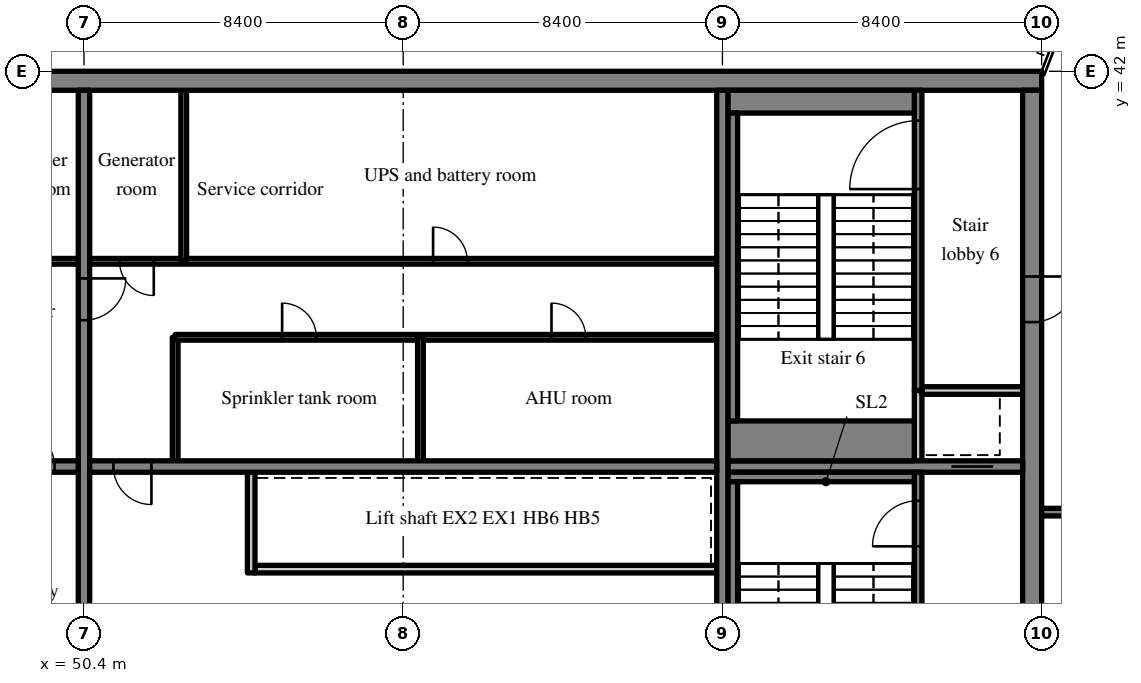
"""IFC4 building model, lengths in metres.
Left out: names, types, materials, properties, quantities, classifications, styles, units other than length and angle.
Written with IfcOpenShell. Run it as: python <this file> out.ifc"""

import sys

from ifc_helpers import new_model, si_unit, direction, frame, frame_2d, origin, place, context, subcontext, project, spatial, rectangle, extrude, source, transform, mapped, element, fill, save


model = new_model("IFC4")
c1 = context("Model", 3, precision=1e-05, world=origin(), true_north=direction((0.0, 1.0)))
c2 = subcontext(c1, "Body", "Model", "MODEL_VIEW")
j1 = project(units=[si_unit("LENGTHUNIT", "METRE"), si_unit("PLANEANGLEUNIT", "RADIAN")], contexts=[c1])
p1 = place(None, origin())
s1 = spatial("IfcSite", under=j1, at=p1, CompositionType="ELEMENT")
p2 = place(p1, origin())
s2 = spatial("IfcBuilding", under=s1, at=p2, CompositionType="ELEMENT")
p3 = place(p2, frame((0.0, 0.0, 317.7)))
s3 = spatial("IfcBuildingStorey", under=s2, at=p3, CompositionType="ELEMENT", Elevation=317.7)
m1 = source(origin(), c2, "Body", "SweptSolid", [
    extrude(rectangle(XDim=50.4, YDim=0.5, at=frame_2d((25.2, 0.0))), origin(), (0.0, 0.0, 1.0), 5.72),
])
p4 = place(p3, frame((25.2, 41.75, 0.0), z_axis=(0.0, 0.0, 1.0), x_axis=(1.0, 0.0, 0.0)))
e1 = element("IfcWall", 1, at=p4, inside=s3, PredefinedType="SHEAR", context=c2, shape_type="MappedRepresentation", body=[
    mapped(m1, transform((0.0, 0.0, 0.0), scale=1.0)),
])
m2 = source(origin(), c2, "Body", "SweptSolid", [
    extrude(rectangle(XDim=19.0, YDim=0.5, at=frame_2d((9.5, 0.0))), origin(), (0.0, 0.0, 1.0), 5.72),
])
p5 = place(p3, frame((75.35, 22.5, 0.0), z_axis=(0.0, 0.0, 1.0), x_axis=(0.0, 1.0, 0.0)))
e2 = element("IfcWall", 2, at=p5, inside=s3, PredefinedType="SHEAR", context=c2, shape_type="MappedRepresentation", body=[
    mapped(m2, transform((0.0, 0.0, 0.0), scale=1.0)),
])
m3 = source(origin(), c2, "Body", "SweptSolid", [
    extrude(rectangle(XDim=1.2, YDim=2.1, at=frame_2d((0.6, 1.05))), frame((0.0, 0.26, 0.0), z_axis=(0.0, -1.0, 0.0), x_axis=(1.0, 0.0, 0.0)), (0.0, 0.0, 1.0), 0.52),
])
p6 = place(p5, frame((12.9, 0.0, 0.0)))
e3 = element("IfcOpeningElement", 3, at=p6, cuts=e2, PredefinedType="OPENING", context=c2, shape_type="MappedRepresentation", body=[
    mapped(m3, transform((0.0, 0.0, 0.0), scale=1.0)),
])
m4 = source(origin(), c2, "Body", "SweptSolid", [
    extrude(rectangle(XDim=19.0, YDim=0.3, at=frame_2d((9.5, 0.0))), origin(), (0.0, 0.0, 1.0), 5.72),
])
p7 = place(p3, frame((50.4, 22.5, 0.0), z_axis=(0.0, 0.0, 1.0), x_axis=(0.0, 1.0, 0.0)))
e4 = element("IfcWall", 4, at=p7, inside=s3, PredefinedType="SHEAR", context=c2, shape_type="MappedRepresentation", body=[
    mapped(m4, transform((0.0, 0.0, 0.0), scale=1.0)),
])
m5 = source(origin(), c2, "Body", "SweptSolid", [
    extrude(rectangle(XDim=1.1, YDim=2.1, at=frame_2d((0.55, 1.05))), frame((0.0, 0.16, 0.0), z_axis=(0.0, -1.0, 0.0), x_axis=(1.0, 0.0, 0.0)), (0.0, 0.0, 1.0), 0.32),
])
p8 = place(p7, frame((12.95, 0.0, 0.0)))
e5 = element("IfcOpeningElement", 5, at=p8, cuts=e4, PredefinedType="OPENING", context=c2, shape_type="MappedRepresentation", body=[
    mapped(m5, transform((0.0, 0.0, 0.0), scale=1.0)),
])
p9 = place(p3, frame((67.2, 22.5, 0.0), z_axis=(0.0, 0.0, 1.0), x_axis=(0.0, 1.0, 0.0)))
e6 = element("IfcWall", 6, at=p9, inside=s3, PredefinedType="SHEAR", context=c2, shape_type="MappedRepresentation", body=[
    mapped(m4, transform((0.0, 0.0, 0.0), scale=1.0)),
])
m6 = source(origin(), c2, "Body", "SweptSolid", [
    extrude(rectangle(XDim=16.5, YDim=0.3, at=frame_2d((8.25, 0.0))), origin(), (0.0, 0.0, 1.0), 5.72),
])
p10 = place(p3, frame((33.75, 31.6, 0.0), z_axis=(0.0, 0.0, 1.0), x_axis=(1.0, 0.0, 0.0)))
e7 = element("IfcWall", 7, at=p10, inside=s3, PredefinedType="SHEAR", context=c2, shape_type="MappedRepresentation", body=[
    mapped(m6, transform((0.0, 0.0, 0.0), scale=1.0)),
])
m7 = source(origin(), c2, "Body", "SweptSolid", [
    extrude(rectangle(XDim=1.0, YDim=2.1, at=frame_2d((0.5, 1.05))), frame((0.0, 0.16, 0.0), z_axis=(0.0, -1.0, 0.0), x_axis=(1.0, 0.0, 0.0)), (0.0, 0.0, 1.0), 0.32),
])
p11 = place(p10, frame((14.875, 0.0, 0.0)))
e8 = element("IfcOpeningElement", 8, at=p11, cuts=e7, PredefinedType="OPENING", context=c2, shape_type="MappedRepresentation", body=[
    mapped(m7, transform((0.0, 0.0, 0.0), scale=1.0)),
])
p12 = place(p3, frame((50.55, 31.6, 0.0), z_axis=(0.0, 0.0, 1.0), x_axis=(1.0, 0.0, 0.0)))
e9 = element("IfcWall", 9, at=p12, inside=s3, PredefinedType="SHEAR", context=c2, shape_type="MappedRepresentation", body=[
    mapped(m6, transform((0.0, 0.0, 0.0), scale=1.0)),
])
p13 = place(p12, frame((0.625, 0.0, 0.0)))
e10 = element("IfcOpeningElement", 10, at=p13, cuts=e9, PredefinedType="OPENING", context=c2, shape_type="MappedRepresentation", body=[
    mapped(m7, transform((0.0, 0.0, 0.0), scale=1.0)),
])
m8 = source(origin(), c2, "Body", "SweptSolid", [
    extrude(rectangle(XDim=7.75, YDim=0.3, at=frame_2d((3.875, 0.0))), origin(), (0.0, 0.0, 1.0), 5.72),
])
p14 = place(p3, frame((67.35, 31.6, 0.0), z_axis=(0.0, 0.0, 1.0), x_axis=(1.0, 0.0, 0.0)))
e11 = element("IfcWall", 11, at=p14, inside=s3, PredefinedType="SHEAR", context=c2, shape_type="MappedRepresentation", body=[
    mapped(m8, transform((0.0, 0.0, 0.0), scale=1.0)),
])
p15 = place(p14, frame((5.875, 0.0, 0.0)))
e12 = element("IfcOpeningElement", 12, at=p15, cuts=e11, PredefinedType="OPENING", context=c2, shape_type="MappedRepresentation", body=[
    mapped(m5, transform((0.0, 0.0, 0.0), scale=1.0)),
])
m9 = source(origin(), c2, "Body", "SweptSolid", [
    extrude(rectangle(XDim=16.5, YDim=0.15, at=frame_2d((8.25, 0.0))), origin(), (0.0, 0.0, 1.0), 5.72),
])
p16 = place(p3, frame((33.75, 37.0, 0.0), z_axis=(0.0, 0.0, 1.0), x_axis=(1.0, 0.0, 0.0)))
e13 = element("IfcWall", 13, at=p16, inside=s3, PredefinedType="PARTITIONING", context=c2, shape_type="MappedRepresentation", body=[
    mapped(m9, transform((0.0, 0.0, 0.0), scale=1.0)),
])
m10 = source(origin(), c2, "Body", "SweptSolid", [
    extrude(rectangle(XDim=0.9, YDim=2.1, at=frame_2d((0.45, 1.05))), frame((0.0, 0.085, 0.0), z_axis=(0.0, -1.0, 0.0), x_axis=(1.0, 0.0, 0.0)), (0.0, 0.0, 1.0), 0.17),
])
p17 = place(p16, frame((0.787, 0.0, 0.0)))
e14 = element("IfcOpeningElement", 14, at=p17, cuts=e13, PredefinedType="OPENING", context=c2, shape_type="MappedRepresentation", body=[
    mapped(m10, transform((0.0, 0.0, 0.0), scale=1.0)),
])
p18 = place(p16, frame((3.675, 0.0, 0.0)))
e15 = element("IfcOpeningElement", 15, at=p18, cuts=e13, PredefinedType="OPENING", context=c2, shape_type="MappedRepresentation", body=[
    mapped(m10, transform((0.0, 0.0, 0.0), scale=1.0)),
])
p19 = place(p16, frame((9.45, 0.0, 0.0)))
e16 = element("IfcOpeningElement", 16, at=p19, cuts=e13, PredefinedType="OPENING", context=c2, shape_type="MappedRepresentation", body=[
    mapped(m10, transform((0.0, 0.0, 0.0), scale=1.0)),
])
p20 = place(p16, frame((14.813, 0.0, 0.0)))
e17 = element("IfcOpeningElement", 17, at=p20, cuts=e13, PredefinedType="OPENING", context=c2, shape_type="MappedRepresentation", body=[
    mapped(m10, transform((0.0, 0.0, 0.0), scale=1.0)),
])
m11 = source(origin(), c2, "Body", "SweptSolid", [
    extrude(rectangle(XDim=12.15, YDim=0.2, at=frame_2d((6.075, 0.0))), origin(), (0.0, 0.0, 1.0), 5.72),
])
p21 = place(p3, frame((67.05, 28.9, 0.0), z_axis=(0.0, 0.0, 1.0), x_axis=(-1.0, 0.0, 0.0)))
e18 = element("IfcWall", 18, at=p21, inside=s3, PredefinedType="SOLIDWALL", context=c2, shape_type="MappedRepresentation", body=[
    mapped(m11, transform((0.0, 0.0, 0.0), scale=1.0)),
])
m12 = source(origin(), c2, "Body", "SweptSolid", [
    extrude(rectangle(XDim=2.65, YDim=0.2, at=frame_2d((1.325, 0.0))), origin(), (0.0, 0.0, 1.0), 5.72),
])
p22 = place(p3, frame((54.8, 28.8, 0.0), z_axis=(0.0, 0.0, 1.0), x_axis=(0.0, 1.0, 0.0)))
e19 = element("IfcWall", 19, at=p22, inside=s3, PredefinedType="SOLIDWALL", context=c2, shape_type="MappedRepresentation", body=[
    mapped(m12, transform((0.0, 0.0, 0.0), scale=1.0)),
])
m13 = source(origin(), c2, "Body", "SweptSolid", [
    extrude(rectangle(XDim=3.25, YDim=0.15, at=frame_2d((1.625, 0.0))), origin(), (0.0, 0.0, 1.0), 5.72),
])
p23 = place(p3, frame((52.8, 31.75, 0.0), z_axis=(0.0, 0.0, 1.0), x_axis=(0.0, 1.0, 0.0)))
e20 = element("IfcWall", 20, at=p23, inside=s3, PredefinedType="PARTITIONING", context=c2, shape_type="MappedRepresentation", body=[
    mapped(m13, transform((0.0, 0.0, 0.0), scale=1.0)),
])
m14 = source(origin(), c2, "Body", "SweptSolid", [
    extrude(rectangle(XDim=14.25, YDim=0.15, at=frame_2d((7.125, 0.0))), origin(), (0.0, 0.0, 1.0), 5.72),
])
p24 = place(p3, frame((67.05, 35.0, 0.0), z_axis=(0.0, 0.0, 1.0), x_axis=(-1.0, 0.0, 0.0)))
e21 = element("IfcWall", 21, at=p24, inside=s3, PredefinedType="PARTITIONING", context=c2, shape_type="MappedRepresentation", body=[
    mapped(m14, transform((0.0, 0.0, 0.0), scale=1.0)),
])
p25 = place(p24, frame((3.448, 0.0, 0.0)))
e22 = element("IfcOpeningElement", 22, at=p25, cuts=e21, PredefinedType="OPENING", context=c2, shape_type="MappedRepresentation", body=[
    mapped(m10, transform((0.0, 0.0, 0.0), scale=1.0)),
])
p26 = place(p24, frame((10.536, 0.0, 0.0)))
e23 = element("IfcOpeningElement", 23, at=p26, cuts=e21, PredefinedType="OPENING", context=c2, shape_type="MappedRepresentation", body=[
    mapped(m10, transform((0.0, 0.0, 0.0), scale=1.0)),
])
p27 = place(p3, frame((67.05, 37.0, 0.0), z_axis=(0.0, 0.0, 1.0), x_axis=(-1.0, 0.0, 0.0)))
e24 = element("IfcWall", 24, at=p27, inside=s3, PredefinedType="PARTITIONING", context=c2, shape_type="MappedRepresentation", body=[
    mapped(m9, transform((0.0, 0.0, 0.0), scale=1.0)),
])
p28 = place(p27, frame((6.563, 0.0, 0.0)))
e25 = element("IfcOpeningElement", 25, at=p28, cuts=e24, PredefinedType="OPENING", context=c2, shape_type="MappedRepresentation", body=[
    mapped(m10, transform((0.0, 0.0, 0.0), scale=1.0)),
])
p29 = place(p27, frame((14.813, 0.0, 0.0)))
e26 = element("IfcOpeningElement", 26, at=p29, cuts=e24, PredefinedType="OPENING", context=c2, shape_type="MappedRepresentation", body=[
    mapped(m10, transform((0.0, 0.0, 0.0), scale=1.0)),
])
p30 = place(p3, frame((59.254, 31.75, 0.0), z_axis=(0.0, 0.0, 1.0), x_axis=(0.0, 1.0, 0.0)))
e27 = element("IfcWall", 27, at=p30, inside=s3, PredefinedType="PARTITIONING", context=c2, shape_type="MappedRepresentation", body=[
    mapped(m13, transform((0.0, 0.0, 0.0), scale=1.0)),
])
m15 = source(origin(), c2, "Body", "SweptSolid", [
    extrude(rectangle(XDim=4.5, YDim=0.15, at=frame_2d((2.25, 0.0))), origin(), (0.0, 0.0, 1.0), 5.72),
])
p31 = place(p3, frame((53.025, 37.0, 0.0), z_axis=(0.0, 0.0, 1.0), x_axis=(0.0, 1.0, 0.0)))
e28 = element("IfcWall", 28, at=p31, inside=s3, PredefinedType="PARTITIONING", context=c2, shape_type="MappedRepresentation", body=[
    mapped(m15, transform((0.0, 0.0, 0.0), scale=1.0)),
])
m16 = source(origin(), c2, "Body", "SweptSolid", [
    extrude(rectangle(XDim=8.95, YDim=0.2, at=frame_2d((4.475, 0.0))), origin(), (0.0, 0.0, 1.0), 5.72),
])
p32 = place(p3, frame((72.35, 22.5, 0.0), z_axis=(0.0, 0.0, 1.0), x_axis=(0.0, 1.0, 0.0)))
e29 = element("IfcWall", 29, at=p32, inside=s3, PredefinedType="SOLIDWALL", context=c2, shape_type="MappedRepresentation", body=[
    mapped(m16, transform((0.0, 0.0, 0.0), scale=1.0)),
])
m17 = source(origin(), c2, "Body", "SweptSolid", [
    extrude(rectangle(XDim=1.2, YDim=2.1, at=frame_2d((0.6, 1.05))), frame((0.0, 0.11, 0.0), z_axis=(0.0, -1.0, 0.0), x_axis=(1.0, 0.0, 0.0)), (0.0, 0.0, 1.0), 0.22),
])
p33 = place(p32, frame((7.0, 0.0, 0.0)))
e30 = element("IfcOpeningElement", 30, at=p33, cuts=e29, PredefinedType="OPENING", context=c2, shape_type="MappedRepresentation", body=[
    mapped(m17, transform((0.0, 0.0, 0.0), scale=1.0)),
])
m18 = source(origin(), c2, "Body", "SweptSolid", [
    extrude(rectangle(XDim=1.85, YDim=0.2, at=frame_2d((0.925, 0.0))), origin(), (0.0, 0.0, 1.0), 5.72),
])
p34 = place(p3, frame((72.35, 31.75, 0.0), z_axis=(0.0, 0.0, 1.0), x_axis=(0.0, 1.0, 0.0)))
e31 = element("IfcWall", 31, at=p34, inside=s3, PredefinedType="SOLIDWALL", context=c2, shape_type="MappedRepresentation", body=[
    mapped(m18, transform((0.0, 0.0, 0.0), scale=1.0)),
])
m19 = source(origin(), c2, "Body", "SweptSolid", [
    extrude(rectangle(XDim=2.65, YDim=0.2, at=frame_2d((1.325, 0.0))), origin(), (0.0, 0.0, 1.0), 5.72),
])
p35 = place(p3, frame((72.45, 33.6, 0.0), z_axis=(0.0, 0.0, 1.0), x_axis=(1.0, 0.0, 0.0)))
e32 = element("IfcWall", 32, at=p35, inside=s3, PredefinedType="SOLIDWALL", context=c2, shape_type="MappedRepresentation", body=[
    mapped(m19, transform((0.0, 0.0, 0.0), scale=1.0)),
])
m20 = source(origin(), c2, "Body", "SweptSolid", [
    extrude(rectangle(XDim=7.9, YDim=0.2, at=frame_2d((3.95, 0.0))), origin(), (0.0, 0.0, 1.0), 5.72),
])
p36 = place(p3, frame((72.35, 33.6, 0.0), z_axis=(0.0, 0.0, 1.0), x_axis=(0.0, 1.0, 0.0)))
e33 = element("IfcWall", 33, at=p36, inside=s3, PredefinedType="SOLIDWALL", context=c2, shape_type="MappedRepresentation", body=[
    mapped(m20, transform((0.0, 0.0, 0.0), scale=1.0)),
])
m21 = source(origin(), c2, "Body", "SweptSolid", [
    extrude(rectangle(XDim=1.8, YDim=2.1, at=frame_2d((0.9, 1.05))), frame((0.0, 0.11, 0.0), z_axis=(0.0, -1.0, 0.0), x_axis=(1.0, 0.0, 0.0)), (0.0, 0.0, 1.0), 0.22),
])
p37 = place(p36, frame((5.3, 0.0, 0.0)))
e34 = element("IfcOpeningElement", 34, at=p37, cuts=e33, PredefinedType="OPENING", context=c2, shape_type="MappedRepresentation", body=[
    mapped(m21, transform((0.0, 0.0, 0.0), scale=1.0)),
])
m22 = source(origin(), c2, "Body", "SweptSolid", [
    extrude(rectangle(XDim=8.15, YDim=0.2, at=frame_2d((4.075, 0.0))), origin(), (0.0, 0.0, 1.0), 5.72),
])
p38 = place(p3, frame((83.75, 30.4, 0.0), z_axis=(0.0, 0.0, 1.0), x_axis=(-1.0, 0.0, 0.0)))
e35 = element("IfcWall", 35, at=p38, inside=s3, PredefinedType="SOLIDWALL", context=c2, shape_type="MappedRepresentation", body=[
    mapped(m22, transform((0.0, 0.0, 0.0), scale=1.0)),
])
m23 = source(origin(), c2, "Body", "SweptSolid", [
    extrude(rectangle(XDim=1.0, YDim=2.1, at=frame_2d((0.5, 1.05))), frame((0.0, 0.11, 0.0), z_axis=(0.0, -1.0, 0.0), x_axis=(1.0, 0.0, 0.0)), (0.0, 0.0, 1.0), 0.22),
])
p39 = place(p38, frame((6.05, 0.0, 0.0)))
e36 = element("IfcOpeningElement", 36, at=p39, cuts=e35, PredefinedType="OPENING", context=c2, shape_type="MappedRepresentation", body=[
    mapped(m23, transform((0.0, 0.0, 0.0), scale=1.0)),
])
m24 = source(origin(), c2, "Body", "SweptSolid", [
    extrude(rectangle(XDim=4.9, YDim=0.25, at=frame_2d((2.45, 0.0))), origin(), (0.0, 0.0, 1.0), 5.72),
])
p40 = place(p3, frame((67.35, 31.325, 0.0), z_axis=(0.0, 0.0, 1.0), x_axis=(1.0, 0.0, 0.0)))
e37 = element("IfcWall", 37, at=p40, inside=s3, PredefinedType="SOLIDWALL", context=c2, shape_type="MappedRepresentation", body=[
    mapped(m24, transform((0.0, 0.0, 0.0), scale=1.0)),
])
m25 = source(origin(), c2, "Body", "SweptSolid", [
    extrude(rectangle(XDim=8.1, YDim=0.25, at=frame_2d((4.05, 0.0))), origin(), (0.0, 0.0, 1.0), 5.72),
])
p41 = place(p3, frame((67.475, 23.1, 0.0), z_axis=(0.0, 0.0, 1.0), x_axis=(0.0, 1.0, 0.0)))
e38 = element("IfcWall", 38, at=p41, inside=s3, PredefinedType="SOLIDWALL", context=c2, shape_type="MappedRepresentation", body=[
    mapped(m25, transform((0.0, 0.0, 0.0), scale=1.0)),
])
m26 = source(origin(), c2, "Body", "SweptSolid", [
    extrude(rectangle(XDim=4.9, YDim=0.6, at=frame_2d((2.45, 0.0))), origin(), (0.0, 0.0, 1.0), 5.72),
])
p42 = place(p3, frame((67.35, 41.2, 0.0), z_axis=(0.0, 0.0, 1.0), x_axis=(1.0, 0.0, 0.0)))
e39 = element("IfcWall", 39, at=p42, inside=s3, PredefinedType="SOLIDWALL", context=c2, shape_type="MappedRepresentation", body=[
    mapped(m26, transform((0.0, 0.0, 0.0), scale=1.0)),
])
m27 = source(origin(), c2, "Body", "SweptSolid", [
    extrude(rectangle(XDim=4.9, YDim=1.05, at=frame_2d((2.45, 0.0))), origin(), (0.0, 0.0, 1.0), 5.72),
])
p43 = place(p3, frame((67.35, 32.275, 0.0), z_axis=(0.0, 0.0, 1.0), x_axis=(1.0, 0.0, 0.0)))
e40 = element("IfcWall", 40, at=p43, inside=s3, PredefinedType="SOLIDWALL", context=c2, shape_type="MappedRepresentation", body=[
    mapped(m27, transform((0.0, 0.0, 0.0), scale=1.0)),
])
p44 = place(p3, frame((67.475, 32.8, 0.0), z_axis=(0.0, 0.0, 1.0), x_axis=(0.0, 1.0, 0.0)))
e41 = element("IfcWall", 41, at=p44, inside=s3, PredefinedType="SOLIDWALL", context=c2, shape_type="MappedRepresentation", body=[
    mapped(m25, transform((0.0, 0.0, 0.0), scale=1.0)),
])
m28 = source(origin(), c2, "Body", "SweptSolid", [
    extrude(rectangle(XDim=1.0, YDim=2.1, at=frame_2d((0.5, 1.05))), frame((0.0, 0.025, 0.0), z_axis=(0.0, -1.0, 0.0), x_axis=(1.0, 0.0, 0.0)), (0.0, 0.0, 1.0), 0.05),
])
p45 = place(p11, origin())
e42 = element("IfcDoor", 42, at=p45, inside=s3, OperationType="SINGLE_SWING_LEFT", PredefinedType="DOOR", context=c2, shape_type="MappedRepresentation", body=[
    mapped(m28, transform((0.0, 0.0, 0.0), scale=1.0)),
])
fill(e8, e42)
p46 = place(p13, origin())
e43 = element("IfcDoor", 43, at=p46, inside=s3, OperationType="SINGLE_SWING_RIGHT", PredefinedType="DOOR", context=c2, shape_type="MappedRepresentation", body=[
    mapped(m28, transform((0.0, 0.0, 0.0), scale=1.0)),
])
fill(e10, e43)
m29 = source(origin(), c2, "Body", "SweptSolid", [
    extrude(rectangle(XDim=0.9, YDim=2.1, at=frame_2d((0.45, 1.05))), frame((0.0, 0.025, 0.0), z_axis=(0.0, -1.0, 0.0), x_axis=(1.0, 0.0, 0.0)), (0.0, 0.0, 1.0), 0.05),
])
p47 = place(p25, origin())
e44 = element("IfcDoor", 44, at=p47, inside=s3, OperationType="SINGLE_SWING_RIGHT", PredefinedType="DOOR", context=c2, shape_type="MappedRepresentation", body=[
    mapped(m29, transform((0.0, 0.0, 0.0), scale=1.0)),
])
fill(e22, e44)
p48 = place(p26, origin())
e45 = element("IfcDoor", 45, at=p48, inside=s3, OperationType="SINGLE_SWING_RIGHT", PredefinedType="DOOR", context=c2, shape_type="MappedRepresentation", body=[
    mapped(m29, transform((0.0, 0.0, 0.0), scale=1.0)),
])
fill(e23, e45)
p49 = place(p28, origin())
e46 = element("IfcDoor", 46, at=p49, inside=s3, OperationType="SINGLE_SWING_RIGHT", PredefinedType="DOOR", context=c2, shape_type="MappedRepresentation", body=[
    mapped(m29, transform((0.0, 0.0, 0.0), scale=1.0)),
])
fill(e25, e46)
p50 = place(p29, origin())
e47 = element("IfcDoor", 47, at=p50, inside=s3, OperationType="SINGLE_SWING_LEFT", PredefinedType="DOOR", context=c2, shape_type="MappedRepresentation", body=[
    mapped(m29, transform((0.0, 0.0, 0.0), scale=1.0)),
])
fill(e26, e47)
m30 = source(origin(), c2, "Body", "SweptSolid", [
    extrude(rectangle(XDim=1.2, YDim=2.1, at=frame_2d((0.6, 1.05))), frame((0.0, 0.025, 0.0), z_axis=(0.0, -1.0, 0.0), x_axis=(1.0, 0.0, 0.0)), (0.0, 0.0, 1.0), 0.05),
])
p51 = place(p33, origin())
e48 = element("IfcDoor", 48, at=p51, inside=s3, OperationType="SINGLE_SWING_LEFT", PredefinedType="DOOR", context=c2, shape_type="MappedRepresentation", body=[
    mapped(m30, transform((0.0, 0.0, 0.0), scale=1.0)),
])
fill(e30, e48)
m31 = source(origin(), c2, "Body", "SweptSolid", [
    extrude(rectangle(XDim=1.1, YDim=2.1, at=frame_2d((0.55, 1.05))), frame((0.0, 0.025, 0.0), z_axis=(0.0, -1.0, 0.0), x_axis=(1.0, 0.0, 0.0)), (0.0, 0.0, 1.0), 0.05),
])
p52 = place(p15, origin())
e49 = element("IfcDoor", 49, at=p52, inside=s3, OperationType="SLIDING_TO_RIGHT", PredefinedType="DOOR", context=c2, shape_type="MappedRepresentation", body=[
    mapped(m31, transform((0.0, 0.0, 0.0), scale=1.0)),
])
fill(e12, e49)
m32 = source(origin(), c2, "Body", "SweptSolid", [
    extrude(rectangle(XDim=1.8, YDim=2.1, at=frame_2d((0.9, 1.05))), frame((0.0, 0.025, 0.0), z_axis=(0.0, -1.0, 0.0), x_axis=(1.0, 0.0, 0.0)), (0.0, 0.0, 1.0), 0.05),
])
p53 = place(p37, origin())
e50 = element("IfcDoor", 50, at=p53, inside=s3, OperationType="SINGLE_SWING_LEFT", PredefinedType="DOOR", context=c2, shape_type="MappedRepresentation", body=[
    mapped(m32, transform((0.0, 0.0, 0.0), scale=1.0)),
])
fill(e34, e50)
p54 = place(p6, origin())
e51 = element("IfcDoor", 51, at=p54, inside=s3, OperationType="SINGLE_SWING_RIGHT", PredefinedType="DOOR", context=c2, shape_type="MappedRepresentation", body=[
    mapped(m30, transform((0.0, 0.0, 0.0), scale=1.0)),
])
fill(e3, e51)
p55 = place(p8, origin())
e52 = element("IfcDoor", 52, at=p55, inside=s3, OperationType="SINGLE_SWING_RIGHT", PredefinedType="DOOR", context=c2, shape_type="MappedRepresentation", body=[
    mapped(m31, transform((0.0, 0.0, 0.0), scale=1.0)),
])
fill(e5, e52)
save(model, sys.argv[1])
